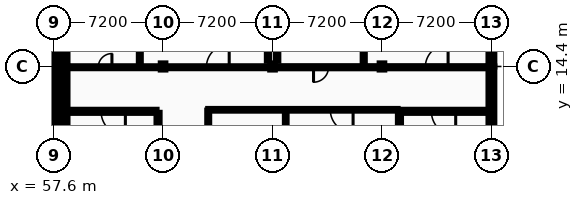
"""IFC4 building model, lengths in metres.
Left out: names, types, materials, properties, quantities, classifications, styles, units other than length and angle.
Written with IfcOpenShell. Run it as: python <this file> out.ifc"""

import sys

from ifc_helpers import new_model, si_unit, direction, frame, frame_2d, origin, origin_2d, place, context, subcontext, project, spatial, rectangle, i_section, extrude, element, fill, save


model = new_model("IFC4")
c1 = context("Model", 3, precision=1e-05, world=origin(), true_north=direction((0.0, 1.0)))
c2 = subcontext(c1, "Body", "Model", "MODEL_VIEW")
j1 = project(units=[si_unit("LENGTHUNIT", "METRE"), si_unit("PLANEANGLEUNIT", "RADIAN")], contexts=[c1])
p1 = place(None, origin())
s1 = spatial("IfcSite", under=j1, at=p1, CompositionType="ELEMENT")
p2 = place(p1, origin())
s2 = spatial("IfcBuilding", under=s1, at=p2, CompositionType="ELEMENT")
p3 = place(p2, frame((0.0, 0.0, 5.2)))
s3 = spatial("IfcBuildingStorey", under=s2, at=p3, CompositionType="ELEMENT", Elevation=5.2)
for number, where, z_axis, x_axis in (
    (1, (57.6, 14.4, 0.0), (0.0, 0.0, 1.0), (1.0, 0.0, 0.0)),
    (2, (58.32, 14.4, 0.0), (0.0, 0.0, 1.0), (1.0, 0.0, 0.0)),
    (3, (64.8, 14.4, 0.0), (0.0, 0.0, 1.0), (1.0, 0.0, 0.0)),
    (4, (72.0, 14.4, 0.0), (0.0, 0.0, 1.0), (1.0, 0.0, 0.0)),
    (5, (79.2, 14.4, 0.0), (0.0, 0.0, 1.0), (1.0, 0.0, 0.0)),
    (6, (86.4, 14.4, 0.0), (0.0, 0.0, 1.0), (1.0, 0.0, 0.0)),
):
    element("IfcColumn", number, at=place(p3, frame(where, z_axis=z_axis, x_axis=x_axis)), inside=s3, PredefinedType="COLUMN", context=c2, shape_type="SweptSolid", body=[
        extrude(i_section(OverallWidth=0.3, OverallDepth=0.4, WebThickness=0.013, FlangeThickness=0.024, FilletRadius=0.027, at=origin_2d()), origin(), (0.0, 0.0, 1.0), 4.4),
    ])
p4 = place(p3, frame((57.6, 8.9, 0.0), z_axis=(0.0, 0.0, 1.0), x_axis=(0.0, 1.0, 0.0)))
e7 = element("IfcWall", 7, at=p4, inside=s3, PredefinedType="STANDARD", context=c2, shape_type="SweptSolid", body=[
    extrude(rectangle(XDim=5.5, YDim=0.38, at=frame_2d((2.75, 0.0))), origin(), (0.0, 0.0, 1.0), 4.185),
])
p5 = place(p3, frame((57.6, 14.4, 0.0), z_axis=(0.0, 0.0, 1.0), x_axis=(0.0, 1.0, 0.0)))
e8 = element("IfcWall", 8, at=p5, inside=s3, PredefinedType="STANDARD", context=c2, shape_type="SweptSolid", body=[
    extrude(rectangle(XDim=7.2, YDim=0.38, at=frame_2d((3.6, 0.0))), origin(), (0.0, 0.0, 1.0), 3.88),
])
p6 = place(p5, frame((1.577, 0.0, 0.95)))
e9 = element("IfcOpeningElement", 9, at=p6, cuts=e8, PredefinedType="OPENING", context=c2, shape_type="SweptSolid", body=[
    extrude(rectangle(XDim=1.166, YDim=1.332, at=frame_2d((0.583, 0.666))), frame((0.0, 0.2, 0.0), z_axis=(0.0, -1.0, 0.0), x_axis=(1.0, 0.0, 0.0)), (0.0, 0.0, 1.0), 0.4),
])
p7 = place(p5, frame((4.457, 0.0, 0.95)))
e10 = element("IfcOpeningElement", 10, at=p7, cuts=e8, PredefinedType="OPENING", context=c2, shape_type="SweptSolid", body=[
    extrude(rectangle(XDim=1.166, YDim=1.332, at=frame_2d((0.583, 0.666))), frame((0.0, 0.2, 0.0), z_axis=(0.0, -1.0, 0.0), x_axis=(1.0, 0.0, 0.0)), (0.0, 0.0, 1.0), 0.4),
])
p8 = place(p3, frame((58.32, 14.4, 0.0), z_axis=(0.0, 0.0, 1.0), x_axis=(0.0, -1.0, 0.0)))
e11 = element("IfcWall", 11, at=p8, inside=s3, PredefinedType="STANDARD", context=c2, shape_type="SweptSolid", body=[
    extrude(rectangle(XDim=5.5, YDim=0.38, at=frame_2d((2.75, 0.0))), origin(), (0.0, 0.0, 1.0), 4.185),
])
p9 = place(p3, frame((58.32, 21.6, 0.0), z_axis=(0.0, 0.0, 1.0), x_axis=(0.0, -1.0, 0.0)))
e12 = element("IfcWall", 12, at=p9, inside=s3, PredefinedType="STANDARD", context=c2, shape_type="SweptSolid", body=[
    extrude(rectangle(XDim=7.2, YDim=0.38, at=frame_2d((3.6, 0.0))), origin(), (0.0, 0.0, 1.0), 3.88),
])
p10 = place(p9, frame((1.713, 0.0, 0.95)))
e13 = element("IfcOpeningElement", 13, at=p10, cuts=e12, PredefinedType="OPENING", context=c2, shape_type="SweptSolid", body=[
    extrude(rectangle(XDim=0.894, YDim=1.296, at=frame_2d((0.447, 0.648))), frame((0.0, 0.2, 0.0), z_axis=(0.0, -1.0, 0.0), x_axis=(1.0, 0.0, 0.0)), (0.0, 0.0, 1.0), 0.4),
])
p11 = place(p9, frame((4.593, 0.0, 0.95)))
e14 = element("IfcOpeningElement", 14, at=p11, cuts=e12, PredefinedType="OPENING", context=c2, shape_type="SweptSolid", body=[
    extrude(rectangle(XDim=0.894, YDim=1.296, at=frame_2d((0.447, 0.648))), frame((0.0, 0.2, 0.0), z_axis=(0.0, -1.0, 0.0), x_axis=(1.0, 0.0, 0.0)), (0.0, 0.0, 1.0), 0.4),
])
p12 = place(p3, frame((86.4, 8.9, 0.0), z_axis=(0.0, 0.0, 1.0), x_axis=(0.0, 1.0, 0.0)))
e15 = element("IfcWall", 15, at=p12, inside=s3, PredefinedType="STANDARD", context=c2, shape_type="SweptSolid", body=[
    extrude(rectangle(XDim=5.5, YDim=0.38, at=frame_2d((2.75, 0.0))), origin(), (0.0, 0.0, 1.0), 4.185),
])
p13 = place(p3, frame((86.4, 14.4, 0.0), z_axis=(0.0, 0.0, 1.0), x_axis=(0.0, 1.0, 0.0)))
e16 = element("IfcWall", 16, at=p13, inside=s3, PredefinedType="STANDARD", context=c2, shape_type="SweptSolid", body=[
    extrude(rectangle(XDim=7.2, YDim=0.38, at=frame_2d((3.6, 0.0))), origin(), (0.0, 0.0, 1.0), 3.81),
])
p14 = place(p13, frame((1.662, 0.0, 0.95)))
e17 = element("IfcOpeningElement", 17, at=p14, cuts=e16, PredefinedType="OPENING", context=c2, shape_type="SweptSolid", body=[
    extrude(rectangle(XDim=0.996, YDim=1.296, at=frame_2d((0.498, 0.648))), frame((0.0, 0.2, 0.0), z_axis=(0.0, -1.0, 0.0), x_axis=(1.0, 0.0, 0.0)), (0.0, 0.0, 1.0), 0.4),
])
p15 = place(p13, frame((4.542, 0.0, 0.95)))
e18 = element("IfcOpeningElement", 18, at=p15, cuts=e16, PredefinedType="OPENING", context=c2, shape_type="SweptSolid", body=[
    extrude(rectangle(XDim=0.996, YDim=1.296, at=frame_2d((0.498, 0.648))), frame((0.0, 0.2, 0.0), z_axis=(0.0, -1.0, 0.0), x_axis=(1.0, 0.0, 0.0)), (0.0, 0.0, 1.0), 0.4),
])
p16 = place(p3, frame((58.67, 11.45, 0.0), z_axis=(0.0, 0.0, 1.0), x_axis=(1.0, 0.0, 0.0)))
e19 = element("IfcWall", 19, at=p16, inside=s3, PredefinedType="PARTITIONING", context=c2, shape_type="SweptSolid", body=[
    extrude(rectangle(XDim=5.7, YDim=0.2, at=frame_2d((2.85, 0.0))), origin(), (0.0, 0.0, 1.0), 4.185),
])
p17 = place(p16, frame((2.05, 0.0, 0.0)))
e20 = element("IfcOpeningElement", 20, at=p17, cuts=e19, PredefinedType="OPENING", context=c2, shape_type="SweptSolid", body=[
    extrude(rectangle(XDim=1.6, YDim=2.2, at=frame_2d((0.8, 1.1))), frame((0.0, 0.11, 0.0), z_axis=(0.0, -1.0, 0.0), x_axis=(1.0, 0.0, 0.0)), (0.0, 0.0, 1.0), 0.22),
])
p18 = place(p3, frame((64.47, 8.9, 0.0), z_axis=(0.0, 0.0, 1.0), x_axis=(0.0, 1.0, 0.0)))
e21 = element("IfcWall", 21, at=p18, inside=s3, PredefinedType="PARTITIONING", context=c2, shape_type="SweptSolid", body=[
    extrude(rectangle(XDim=2.45, YDim=0.2, at=frame_2d((1.225, 0.0))), origin(), (0.0, 0.0, 1.0), 4.185),
])
p19 = place(p3, frame((80.45, 11.45, 0.0), z_axis=(0.0, 0.0, 1.0), x_axis=(1.0, 0.0, 0.0)))
e22 = element("IfcWall", 22, at=p19, inside=s3, PredefinedType="PARTITIONING", context=c2, shape_type="SweptSolid", body=[
    extrude(rectangle(XDim=5.6, YDim=0.2, at=frame_2d((2.8, 0.0))), origin(), (0.0, 0.0, 1.0), 4.185),
])
p20 = place(p19, frame((2.0, 0.0, 0.0)))
e23 = element("IfcOpeningElement", 23, at=p20, cuts=e22, PredefinedType="OPENING", context=c2, shape_type="SweptSolid", body=[
    extrude(rectangle(XDim=1.6, YDim=2.2, at=frame_2d((0.8, 1.1))), frame((0.0, 0.11, 0.0), z_axis=(0.0, -1.0, 0.0), x_axis=(1.0, 0.0, 0.0)), (0.0, 0.0, 1.0), 0.22),
])
p21 = place(p3, frame((80.35, 8.9, 0.0), z_axis=(0.0, 0.0, 1.0), x_axis=(0.0, 1.0, 0.0)))
e24 = element("IfcWall", 24, at=p21, inside=s3, PredefinedType="PARTITIONING", context=c2, shape_type="SweptSolid", body=[
    extrude(rectangle(XDim=2.45, YDim=0.2, at=frame_2d((1.225, 0.0))), origin(), (0.0, 0.0, 1.0), 4.185),
])
p22 = place(p3, frame((67.77, 11.55, 0.0), z_axis=(0.0, 0.0, 1.0), x_axis=(1.0, 0.0, 0.0)))
e25 = element("IfcWall", 25, at=p22, inside=s3, PredefinedType="PARTITIONING", context=c2, shape_type="SweptSolid", body=[
    extrude(rectangle(XDim=12.46, YDim=0.11, at=frame_2d((6.23, 0.0))), origin(), (0.0, 0.0, 1.0), 4.185),
])
p23 = place(p22, frame((0.45, 0.0, 0.0)))
e26 = element("IfcOpeningElement", 26, at=p23, cuts=e25, PredefinedType="OPENING", context=c2, shape_type="SweptSolid", body=[
    extrude(rectangle(XDim=1.0, YDim=2.1, at=frame_2d((0.5, 1.05))), frame((0.0, 0.065, 0.0), z_axis=(0.0, -1.0, 0.0), x_axis=(1.0, 0.0, 0.0)), (0.0, 0.0, 1.0), 0.13),
])
p24 = place(p22, frame((8.03, 0.0, 0.0)))
e27 = element("IfcOpeningElement", 27, at=p24, cuts=e25, PredefinedType="OPENING", context=c2, shape_type="SweptSolid", body=[
    extrude(rectangle(XDim=1.5, YDim=2.2, at=frame_2d((0.75, 1.1))), frame((0.0, 0.065, 0.0), z_axis=(0.0, -1.0, 0.0), x_axis=(1.0, 0.0, 0.0)), (0.0, 0.0, 1.0), 0.13),
])
p25 = place(p3, frame((58.7, 14.35, 0.0), z_axis=(0.0, 0.0, 1.0), x_axis=(1.0, 0.0, 0.0)))
e28 = element("IfcWall", 28, at=p25, inside=s3, PredefinedType="PARTITIONING", context=c2, shape_type="SweptSolid", body=[
    extrude(rectangle(XDim=5.72, YDim=0.125, at=frame_2d((2.86, 0.0))), origin(), (0.0, 0.0, 1.0), 3.88),
])
p26 = place(p25, frame((1.835, 0.0, 0.0)))
e29 = element("IfcOpeningElement", 29, at=p26, cuts=e28, PredefinedType="OPENING", context=c2, shape_type="SweptSolid", body=[
    extrude(rectangle(XDim=0.9, YDim=2.1, at=frame_2d((0.45, 1.05))), frame((0.0, 0.073, 0.0), z_axis=(0.0, -1.0, 0.0), x_axis=(1.0, 0.0, 0.0)), (0.0, 0.0, 1.0), 0.145),
])
p27 = place(p3, frame((65.18, 14.35, 0.0), z_axis=(0.0, 0.0, 1.0), x_axis=(1.0, 0.0, 0.0)))
e30 = element("IfcWall", 30, at=p27, inside=s3, PredefinedType="PARTITIONING", context=c2, shape_type="SweptSolid", body=[
    extrude(rectangle(XDim=6.44, YDim=0.125, at=frame_2d((3.22, 0.0))), origin(), (0.0, 0.0, 1.0), 3.88),
])
p28 = place(p27, frame((2.47, 0.0, 0.0)))
e31 = element("IfcOpeningElement", 31, at=p28, cuts=e30, PredefinedType="OPENING", context=c2, shape_type="SweptSolid", body=[
    extrude(rectangle(XDim=1.5, YDim=2.2, at=frame_2d((0.75, 1.1))), frame((0.0, 0.073, 0.0), z_axis=(0.0, -1.0, 0.0), x_axis=(1.0, 0.0, 0.0)), (0.0, 0.0, 1.0), 0.145),
])
p29 = place(p3, frame((72.38, 14.35, 0.0), z_axis=(0.0, 0.0, 1.0), x_axis=(1.0, 0.0, 0.0)))
e32 = element("IfcWall", 32, at=p29, inside=s3, PredefinedType="PARTITIONING", context=c2, shape_type="SweptSolid", body=[
    extrude(rectangle(XDim=6.44, YDim=0.135, at=frame_2d((3.22, 0.0))), origin(), (0.0, 0.0, 1.0), 3.88),
])
p30 = place(p29, frame((2.318, 0.0, 0.0)))
e33 = element("IfcOpeningElement", 33, at=p30, cuts=e32, PredefinedType="OPENING", context=c2, shape_type="SweptSolid", body=[
    extrude(rectangle(XDim=0.984, YDim=2.124, at=frame_2d((0.492, 1.062))), frame((0.0, 0.078, 0.0), z_axis=(0.0, -1.0, 0.0), x_axis=(1.0, 0.0, 0.0)), (0.0, 0.0, 1.0), 0.155),
])
p31 = place(p3, frame((79.58, 14.35, 0.0), z_axis=(0.0, 0.0, 1.0), x_axis=(1.0, 0.0, 0.0)))
e34 = element("IfcWall", 34, at=p31, inside=s3, PredefinedType="PARTITIONING", context=c2, shape_type="SweptSolid", body=[
    extrude(rectangle(XDim=6.44, YDim=0.135, at=frame_2d((3.22, 0.0))), origin(), (0.0, 0.0, 1.0), 3.88),
])
p32 = place(p31, frame((2.47, 0.0, 0.0)))
e35 = element("IfcOpeningElement", 35, at=p32, cuts=e34, PredefinedType="OPENING", context=c2, shape_type="SweptSolid", body=[
    extrude(rectangle(XDim=1.5, YDim=2.2, at=frame_2d((0.75, 1.1))), frame((0.0, 0.078, 0.0), z_axis=(0.0, -1.0, 0.0), x_axis=(1.0, 0.0, 0.0)), (0.0, 0.0, 1.0), 0.155),
])
p33 = place(p3, frame((63.27, 14.413, 0.0), z_axis=(0.0, 0.0, 1.0), x_axis=(0.0, 1.0, 0.0)))
e36 = element("IfcWall", 36, at=p33, inside=s3, PredefinedType="PARTITIONING", context=c2, shape_type="SweptSolid", body=[
    extrude(rectangle(XDim=14.188, YDim=0.125, at=frame_2d((7.094, 0.0))), origin(), (0.0, 0.0, 1.0), 4.185),
])
p34 = place(p3, frame((67.77, 3.36, 0.0), z_axis=(0.0, 0.0, 1.0), x_axis=(0.0, 1.0, 0.0)))
e37 = element("IfcWall", 37, at=p34, inside=s3, PredefinedType="PARTITIONING", context=c2, shape_type="SweptSolid", body=[
    extrude(rectangle(XDim=8.135, YDim=0.125, at=frame_2d((4.067, 0.0))), origin(), (0.0, 0.0, 1.0), 4.185),
])
p35 = place(p3, frame((71.7, 14.78, 0.0), z_axis=(0.0, 0.0, 1.0), x_axis=(0.0, 1.0, 0.0)))
e38 = element("IfcWall", 38, at=p35, inside=s3, PredefinedType="PARTITIONING", context=c2, shape_type="SweptSolid", body=[
    extrude(rectangle(XDim=6.44, YDim=0.142, at=frame_2d((3.22, 0.0))), origin(), (0.0, 0.0, 1.0), 3.88),
])
p36 = place(p3, frame((72.3, 14.78, 0.0), z_axis=(0.0, 0.0, 1.0), x_axis=(0.0, 1.0, 0.0)))
e39 = element("IfcWall", 39, at=p36, inside=s3, PredefinedType="PARTITIONING", context=c2, shape_type="SweptSolid", body=[
    extrude(rectangle(XDim=6.44, YDim=0.16, at=frame_2d((3.22, 0.0))), origin(), (0.0, 0.0, 1.0), 3.88),
])
p37 = place(p3, frame((72.87, 0.2, 0.0), z_axis=(0.0, 0.0, 1.0), x_axis=(0.0, 1.0, 0.0)))
e40 = element("IfcWall", 40, at=p37, inside=s3, PredefinedType="PARTITIONING", context=c2, shape_type="SweptSolid", body=[
    extrude(rectangle(XDim=11.295, YDim=0.11, at=frame_2d((5.647, 0.0))), origin(), (0.0, 0.0, 1.0), 4.185),
])
p38 = place(p3, frame((78.0, 14.417, 0.0), z_axis=(0.0, 0.0, 1.0), x_axis=(0.0, 1.0, 0.0)))
e41 = element("IfcWall", 41, at=p38, inside=s3, PredefinedType="PARTITIONING", context=c2, shape_type="SweptSolid", body=[
    extrude(rectangle(XDim=14.112, YDim=0.135, at=frame_2d((7.056, 0.0))), origin(), (0.0, 0.0, 1.0), 4.185),
])
p39 = place(p17, origin())
e42 = element("IfcDoor", 42, at=p39, inside=s3, OperationType="DOUBLE_DOOR_SINGLE_SWING", PredefinedType="DOOR", context=c2, shape_type="SweptSolid", body=[
    extrude(rectangle(XDim=1.6, YDim=2.2, at=frame_2d((0.8, 1.1))), frame((0.0, 0.025, 0.0), z_axis=(0.0, -1.0, 0.0), x_axis=(1.0, 0.0, 0.0)), (0.0, 0.0, 1.0), 0.05),
])
fill(e20, e42)
p40 = place(p20, origin())
e43 = element("IfcDoor", 43, at=p40, inside=s3, OperationType="DOUBLE_DOOR_SINGLE_SWING", PredefinedType="DOOR", context=c2, shape_type="SweptSolid", body=[
    extrude(rectangle(XDim=1.6, YDim=2.2, at=frame_2d((0.8, 1.1))), frame((0.0, 0.025, 0.0), z_axis=(0.0, -1.0, 0.0), x_axis=(1.0, 0.0, 0.0)), (0.0, 0.0, 1.0), 0.05),
])
fill(e23, e43)
p41 = place(p23, origin())
e44 = element("IfcDoor", 44, at=p41, inside=s3, OperationType="SLIDING_TO_LEFT", PredefinedType="DOOR", context=c2, shape_type="SweptSolid", body=[
    extrude(rectangle(XDim=1.0, YDim=2.1, at=frame_2d((0.5, 1.05))), frame((0.0, 0.025, 0.0), z_axis=(0.0, -1.0, 0.0), x_axis=(1.0, 0.0, 0.0)), (0.0, 0.0, 1.0), 0.05),
])
fill(e26, e44)
p42 = place(p26, frame((0.9, 0.0, 0.0), z_axis=(0.0, 0.0, 1.0), x_axis=(-1.0, 0.0, 0.0)))
e45 = element("IfcDoor", 45, at=p42, inside=s3, OperationType="SINGLE_SWING_RIGHT", PredefinedType="DOOR", context=c2, shape_type="SweptSolid", body=[
    extrude(rectangle(XDim=0.9, YDim=2.1, at=frame_2d((0.45, 1.05))), frame((0.0, 0.025, 0.0), z_axis=(0.0, -1.0, 0.0), x_axis=(1.0, 0.0, 0.0)), (0.0, 0.0, 1.0), 0.05),
])
fill(e29, e45)
p43 = place(p30, frame((0.984, 0.0, 0.0), z_axis=(0.0, 0.0, 1.0), x_axis=(-1.0, 0.0, 0.0)))
e46 = element("IfcDoor", 46, at=p43, inside=s3, OperationType="SINGLE_SWING_LEFT", PredefinedType="DOOR", context=c2, shape_type="SweptSolid", body=[
    extrude(rectangle(XDim=0.984, YDim=2.124, at=frame_2d((0.492, 1.062))), frame((0.0, 0.025, 0.0), z_axis=(0.0, -1.0, 0.0), x_axis=(1.0, 0.0, 0.0)), (0.0, 0.0, 1.0), 0.05),
])
fill(e33, e46)
p44 = place(p24, origin())
e47 = element("IfcDoor", 47, at=p44, inside=s3, OperationType="DOUBLE_DOOR_SINGLE_SWING", PredefinedType="DOOR", context=c2, shape_type="SweptSolid", body=[
    extrude(rectangle(XDim=1.5, YDim=2.2, at=frame_2d((0.75, 1.1))), frame((0.0, 0.025, 0.0), z_axis=(0.0, -1.0, 0.0), x_axis=(1.0, 0.0, 0.0)), (0.0, 0.0, 1.0), 0.05),
])
fill(e27, e47)
p45 = place(p32, frame((1.5, 0.0, 0.0), z_axis=(0.0, 0.0, 1.0), x_axis=(-1.0, 0.0, 0.0)))
e48 = element("IfcDoor", 48, at=p45, inside=s3, OperationType="DOUBLE_DOOR_SINGLE_SWING", PredefinedType="DOOR", context=c2, shape_type="SweptSolid", body=[
    extrude(rectangle(XDim=1.5, YDim=2.2, at=frame_2d((0.75, 1.1))), frame((0.0, 0.025, 0.0), z_axis=(0.0, -1.0, 0.0), x_axis=(1.0, 0.0, 0.0)), (0.0, 0.0, 1.0), 0.05),
])
fill(e35, e48)
p46 = place(p28, frame((1.5, 0.0, 0.0), z_axis=(0.0, 0.0, 1.0), x_axis=(-1.0, 0.0, 0.0)))
e49 = element("IfcDoor", 49, at=p46, inside=s3, OperationType="DOUBLE_DOOR_SINGLE_SWING", PredefinedType="DOOR", context=c2, shape_type="SweptSolid", body=[
    extrude(rectangle(XDim=1.5, YDim=2.2, at=frame_2d((0.75, 1.1))), frame((0.0, 0.025, 0.0), z_axis=(0.0, -1.0, 0.0), x_axis=(1.0, 0.0, 0.0)), (0.0, 0.0, 1.0), 0.05),
])
fill(e31, e49)
save(model, sys.argv[1])
